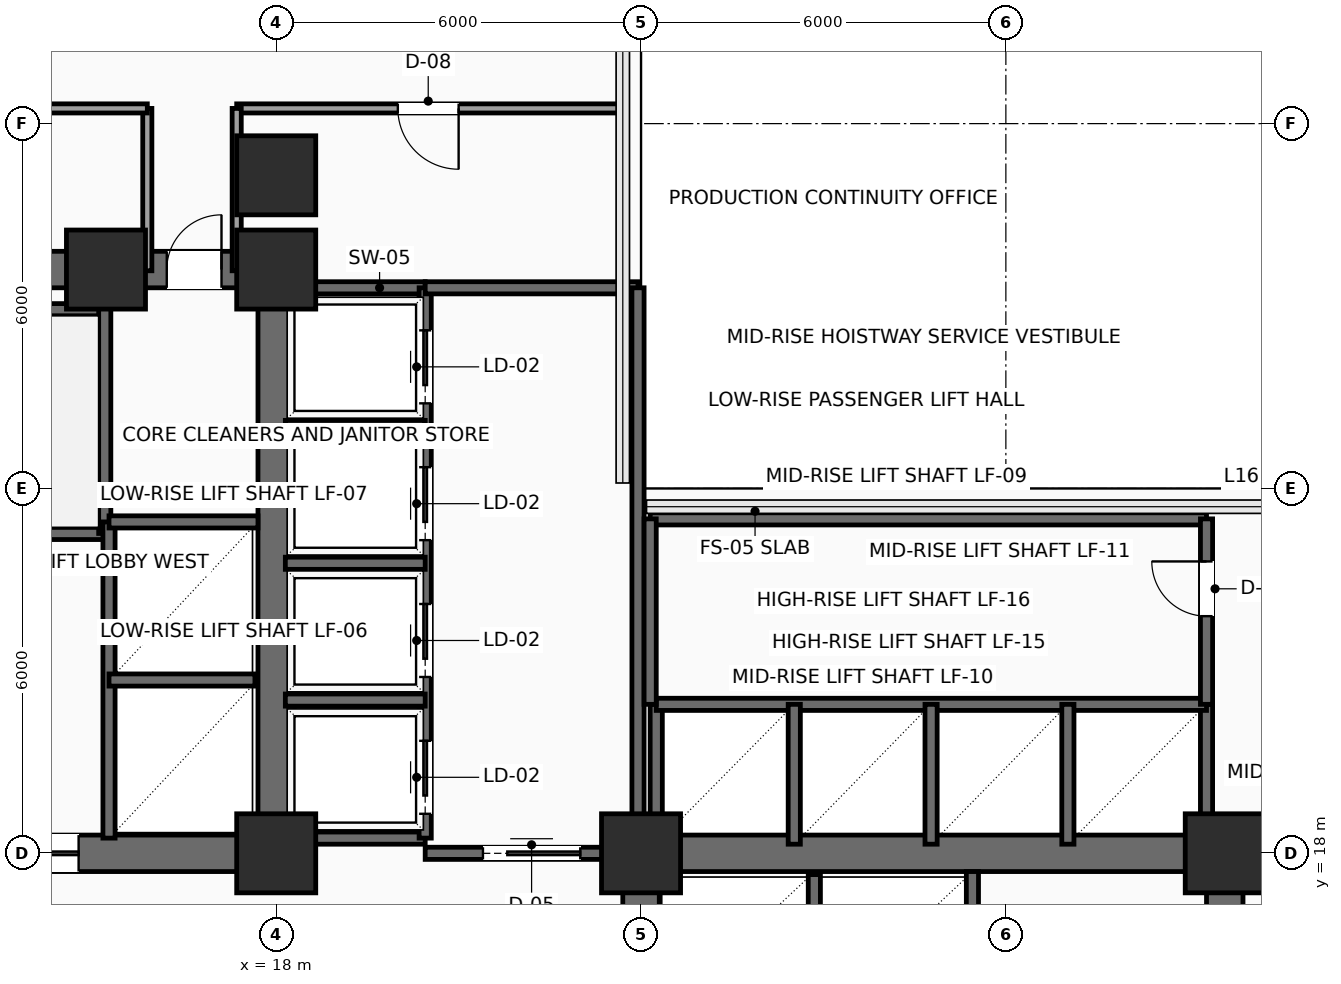
"""IFC4 building model, lengths in metres.
Left out: names, types, materials, properties, quantities, classifications, styles, units other than length and angle.
Written with IfcOpenShell. Run it as: python <this file> out.ifc"""

import sys

from ifc_helpers import new_model, si_unit, direction, frame, frame_2d, origin, origin_2d, place, context, subcontext, project, spatial, rectangle, extrude, element, fill, save


model = new_model("IFC4")
c1 = context("Model", 3, precision=1e-05, world=origin(), true_north=direction((0.0, 1.0)))
c2 = subcontext(c1, "Body", "Model", "MODEL_VIEW")
j1 = project(units=[si_unit("LENGTHUNIT", "METRE"), si_unit("PLANEANGLEUNIT", "RADIAN")], contexts=[c1])
p1 = place(None, origin())
s1 = spatial("IfcSite", under=j1, at=p1, CompositionType="ELEMENT")
p2 = place(p1, origin())
s2 = spatial("IfcBuilding", under=s1, at=p2, CompositionType="ELEMENT")
p3 = place(p2, frame((0.0, 0.0, 71.4)))
s3 = spatial("IfcBuildingStorey", under=s2, at=p3, CompositionType="ELEMENT", Elevation=71.4)
for number, where, z_axis, x_axis in (
    (1, (18.0, 18.0, 0.0), (0.0, 0.0, 1.0), (1.0, 0.0, 0.0)),
    (2, (15.2, 27.6, 0.0), (0.0, 0.0, 1.0), (1.0, 0.0, 0.0)),
    (3, (18.0, 27.6, 0.0), (0.0, 0.0, 1.0), (1.0, 0.0, 0.0)),
    (4, (24.0, 18.0, 0.0), (0.0, 0.0, 1.0), (1.0, 0.0, 0.0)),
    (5, (33.6, 18.0, 0.0), (0.0, 0.0, 1.0), (1.0, 0.0, 0.0)),
    (6, (18.0, 29.15, 0.0), (0.0, 0.0, 1.0), (1.0, 0.0, 0.0)),
):
    element("IfcColumn", number, at=place(p3, frame(where, z_axis=z_axis, x_axis=x_axis)), inside=s3, PredefinedType="COLUMN", context=c2, shape_type="SweptSolid", body=[
        extrude(rectangle(XDim=1.3, YDim=1.3, at=origin_2d()), origin(), (0.0, 0.0, 1.0), 3.9),
    ])
p4 = place(p3, frame((6.0, 18.0, 0.0), z_axis=(0.0, 0.0, 1.0), x_axis=(1.0, 0.0, 0.0)))
e7 = element("IfcWall", 7, at=p4, inside=s3, PredefinedType="SHEAR", context=c2, shape_type="SweptSolid", body=[
    extrude(rectangle(XDim=12.0, YDim=0.6, at=frame_2d((6.0, 0.0))), origin(), (0.0, 0.0, 1.0), 3.65),
])
p5 = place(p4, frame((7.15, 0.0, 0.0)))
e8 = element("IfcOpeningElement", 8, at=p5, cuts=e7, PredefinedType="OPENING", context=c2, shape_type="SweptSolid", body=[
    extrude(rectangle(XDim=1.6, YDim=2.3, at=frame_2d((0.8, 1.15))), frame((0.0, 0.31, 0.0), z_axis=(0.0, -1.0, 0.0), x_axis=(1.0, 0.0, 0.0)), (0.0, 0.0, 1.0), 0.62),
])
p6 = place(p3, frame((6.0, 27.6, 0.0), z_axis=(0.0, 0.0, 1.0), x_axis=(1.0, 0.0, 0.0)))
e9 = element("IfcWall", 9, at=p6, inside=s3, PredefinedType="SHEAR", context=c2, shape_type="SweptSolid", body=[
    extrude(rectangle(XDim=12.0, YDim=0.6, at=frame_2d((6.0, 0.0))), origin(), (0.0, 0.0, 1.0), 3.65),
])
p7 = place(p6, frame((10.2, 0.0, 0.0)))
e10 = element("IfcOpeningElement", 10, at=p7, cuts=e9, PredefinedType="OPENING", context=c2, shape_type="SweptSolid", body=[
    extrude(rectangle(XDim=0.9, YDim=2.15, at=frame_2d((0.45, 1.075))), frame((0.0, 0.31, 0.0), z_axis=(0.0, -1.0, 0.0), x_axis=(1.0, 0.0, 0.0)), (0.0, 0.0, 1.0), 0.62),
])
for number, where, z_axis, x_axis in (
    (11, (18.0, 18.0, 0.0), (0.0, 0.0, 1.0), (0.0, 1.0, 0.0)),
    (12, (24.0, 18.0, 0.0), (0.0, 0.0, 1.0), (1.0, 0.0, 0.0)),
):
    element("IfcWall", number, at=place(p3, frame(where, z_axis=z_axis, x_axis=x_axis)), inside=s3, PredefinedType="SHEAR", context=c2, shape_type="SweptSolid", body=[
        extrude(rectangle(XDim=9.6, YDim=0.6, at=frame_2d((4.8, 0.0))), origin(), (0.0, 0.0, 1.0), 3.65),
    ])
p8 = place(p3, frame((24.0, 6.0, 0.0), z_axis=(0.0, 0.0, 1.0), x_axis=(0.0, 1.0, 0.0)))
e13 = element("IfcWall", 13, at=p8, inside=s3, PredefinedType="SHEAR", context=c2, shape_type="SweptSolid", body=[
    extrude(rectangle(XDim=12.0, YDim=0.6, at=frame_2d((6.0, 0.0))), origin(), (0.0, 0.0, 1.0), 3.65),
])
p9 = place(p8, frame((7.15, 0.0, 0.0)))
e14 = element("IfcOpeningElement", 14, at=p9, cuts=e13, PredefinedType="OPENING", context=c2, shape_type="SweptSolid", body=[
    extrude(rectangle(XDim=1.6, YDim=2.3, at=frame_2d((0.8, 1.15))), frame((0.0, 0.31, 0.0), z_axis=(0.0, -1.0, 0.0), x_axis=(1.0, 0.0, 0.0)), (0.0, 0.0, 1.0), 0.62),
])
p10 = place(p3, frame((33.6, 6.0, 0.0), z_axis=(0.0, 0.0, 1.0), x_axis=(0.0, 1.0, 0.0)))
e15 = element("IfcWall", 15, at=p10, inside=s3, PredefinedType="SHEAR", context=c2, shape_type="SweptSolid", body=[
    extrude(rectangle(XDim=12.0, YDim=0.6, at=frame_2d((6.0, 0.0))), origin(), (0.0, 0.0, 1.0), 3.65),
])
p11 = place(p10, frame((10.2, 0.0, 0.0)))
e16 = element("IfcOpeningElement", 16, at=p11, cuts=e15, PredefinedType="OPENING", context=c2, shape_type="SweptSolid", body=[
    extrude(rectangle(XDim=0.9, YDim=2.15, at=frame_2d((0.45, 1.075))), frame((0.0, 0.31, 0.0), z_axis=(0.0, -1.0, 0.0), x_axis=(1.0, 0.0, 0.0)), (0.0, 0.0, 1.0), 0.62),
])
p12 = place(p3, frame((6.3, 23.26, 0.0), z_axis=(0.0, 0.0, 1.0), x_axis=(1.0, 0.0, 0.0)))
e17 = element("IfcWall", 17, at=p12, inside=s3, PredefinedType="SHEAR", context=c2, shape_type="SweptSolid", body=[
    extrude(rectangle(XDim=8.88, YDim=0.2, at=frame_2d((4.44, 0.0))), origin(), (0.0, 0.0, 1.0), 3.65),
])
p13 = place(p12, frame((0.35, 0.0, 0.0)))
e18 = element("IfcOpeningElement", 18, at=p13, cuts=e17, PredefinedType="OPENING", context=c2, shape_type="SweptSolid", body=[
    extrude(rectangle(XDim=1.1, YDim=2.2, at=frame_2d((0.55, 1.1))), frame((0.0, 0.11, 0.0), z_axis=(0.0, -1.0, 0.0), x_axis=(1.0, 0.0, 0.0)), (0.0, 0.0, 1.0), 0.22),
])
p14 = place(p3, frame((6.3, 26.94, 0.0), z_axis=(0.0, 0.0, 1.0), x_axis=(1.0, 0.0, 0.0)))
e19 = element("IfcWall", 19, at=p14, inside=s3, PredefinedType="SHEAR", context=c2, shape_type="SweptSolid", body=[
    extrude(rectangle(XDim=8.88, YDim=0.2, at=frame_2d((4.44, 0.0))), origin(), (0.0, 0.0, 1.0), 3.65),
])
p15 = place(p3, frame((15.18, 23.26, 0.0), z_axis=(0.0, 0.0, 1.0), x_axis=(0.0, 1.0, 0.0)))
e20 = element("IfcWall", 20, at=p15, inside=s3, PredefinedType="SHEAR", context=c2, shape_type="SweptSolid", body=[
    extrude(rectangle(XDim=4.04, YDim=0.2, at=frame_2d((2.02, 0.0))), origin(), (0.0, 0.0, 1.0), 3.65),
])
p16 = place(p3, frame((15.25, 18.25, 0.0), z_axis=(0.0, 0.0, 1.0), x_axis=(0.0, 1.0, 0.0)))
e21 = element("IfcWall", 21, at=p16, inside=s3, PredefinedType="SHEAR", context=c2, shape_type="SweptSolid", body=[
    extrude(rectangle(XDim=5.2, YDim=0.2, at=frame_2d((2.6, 0.0))), origin(), (0.0, 0.0, 1.0), 3.65),
])
p17 = place(p3, frame((15.25, 20.85, 0.0), z_axis=(0.0, 0.0, 1.0), x_axis=(1.0, 0.0, 0.0)))
e22 = element("IfcWall", 22, at=p17, inside=s3, PredefinedType="SHEAR", context=c2, shape_type="SweptSolid", body=[
    extrude(rectangle(XDim=2.4, YDim=0.2, at=frame_2d((1.2, 0.0))), origin(), (0.0, 0.0, 1.0), 3.65),
])
p18 = place(p3, frame((15.25, 23.45, 0.0), z_axis=(0.0, 0.0, 1.0), x_axis=(1.0, 0.0, 0.0)))
e23 = element("IfcWall", 23, at=p18, inside=s3, PredefinedType="SHEAR", context=c2, shape_type="SweptSolid", body=[
    extrude(rectangle(XDim=2.45, YDim=0.2, at=frame_2d((1.225, 0.0))), origin(), (0.0, 0.0, 1.0), 3.65),
])
p19 = place(p3, frame((26.85, 15.25, 0.0), z_axis=(0.0, 0.0, 1.0), x_axis=(0.0, 1.0, 0.0)))
e24 = element("IfcWall", 24, at=p19, inside=s3, PredefinedType="SHEAR", context=c2, shape_type="SweptSolid", body=[
    extrude(rectangle(XDim=2.4, YDim=0.2, at=frame_2d((1.2, 0.0))), origin(), (0.0, 0.0, 1.0), 3.65),
])
p20 = place(p3, frame((29.45, 15.25, 0.0), z_axis=(0.0, 0.0, 1.0), x_axis=(0.0, 1.0, 0.0)))
e25 = element("IfcWall", 25, at=p20, inside=s3, PredefinedType="SHEAR", context=c2, shape_type="SweptSolid", body=[
    extrude(rectangle(XDim=2.45, YDim=0.2, at=frame_2d((1.225, 0.0))), origin(), (0.0, 0.0, 1.0), 3.65),
])
for number, where, z_axis, x_axis in (
    (26, (18.1, 27.3, 0.0), (0.0, 0.0, 1.0), (1.0, 0.0, 0.0)),
    (27, (18.1, 18.25, 0.0), (0.0, 0.0, 1.0), (1.0, 0.0, 0.0)),
):
    element("IfcWall", number, at=place(p3, frame(where, z_axis=z_axis, x_axis=x_axis)), inside=s3, PredefinedType="SHEAR", context=c2, shape_type="SweptSolid", body=[
        extrude(rectangle(XDim=2.35, YDim=0.2, at=frame_2d((1.175, 0.0))), origin(), (0.0, 0.0, 1.0), 3.65),
    ])
p21 = place(p3, frame((20.45, 18.25, 0.0), z_axis=(0.0, 0.0, 1.0), x_axis=(0.0, 1.0, 0.0)))
e28 = element("IfcWall", 28, at=p21, inside=s3, PredefinedType="SHEAR", context=c2, shape_type="SweptSolid", body=[
    extrude(rectangle(XDim=9.05, YDim=0.2, at=frame_2d((4.525, 0.0))), origin(), (0.0, 0.0, 1.0), 3.65),
])
p22 = place(p21, frame((0.4, 0.0, 0.0)))
e29 = element("IfcOpeningElement", 29, at=p22, cuts=e28, PredefinedType="OPENING", context=c2, shape_type="SweptSolid", body=[
    extrude(rectangle(XDim=1.2, YDim=2.2, at=frame_2d((0.6, 1.1))), frame((0.0, 0.11, 0.0), z_axis=(0.0, -1.0, 0.0), x_axis=(1.0, 0.0, 0.0)), (0.0, 0.0, 1.0), 0.22),
])
p23 = place(p21, frame((2.65, 0.0, 0.0)))
e30 = element("IfcOpeningElement", 30, at=p23, cuts=e28, PredefinedType="OPENING", context=c2, shape_type="SweptSolid", body=[
    extrude(rectangle(XDim=1.2, YDim=2.2, at=frame_2d((0.6, 1.1))), frame((0.0, 0.11, 0.0), z_axis=(0.0, -1.0, 0.0), x_axis=(1.0, 0.0, 0.0)), (0.0, 0.0, 1.0), 0.22),
])
p24 = place(p21, frame((4.9, 0.0, 0.0)))
e31 = element("IfcOpeningElement", 31, at=p24, cuts=e28, PredefinedType="OPENING", context=c2, shape_type="SweptSolid", body=[
    extrude(rectangle(XDim=1.2, YDim=2.2, at=frame_2d((0.6, 1.1))), frame((0.0, 0.11, 0.0), z_axis=(0.0, -1.0, 0.0), x_axis=(1.0, 0.0, 0.0)), (0.0, 0.0, 1.0), 0.22),
])
p25 = place(p21, frame((7.15, 0.0, 0.0)))
e32 = element("IfcOpeningElement", 32, at=p25, cuts=e28, PredefinedType="OPENING", context=c2, shape_type="SweptSolid", body=[
    extrude(rectangle(XDim=1.2, YDim=2.2, at=frame_2d((0.6, 1.1))), frame((0.0, 0.11, 0.0), z_axis=(0.0, -1.0, 0.0), x_axis=(1.0, 0.0, 0.0)), (0.0, 0.0, 1.0), 0.22),
])
for number, where, z_axis, x_axis in (
    (33, (18.15, 20.52, 0.0), (0.0, 0.0, 1.0), (1.0, 0.0, 0.0)),
    (34, (18.15, 22.77, 0.0), (0.0, 0.0, 1.0), (1.0, 0.0, 0.0)),
    (35, (18.15, 25.02, 0.0), (0.0, 0.0, 1.0), (1.0, 0.0, 0.0)),
):
    element("IfcWall", number, at=place(p3, frame(where, z_axis=z_axis, x_axis=x_axis)), inside=s3, PredefinedType="SHEAR", context=c2, shape_type="SweptSolid", body=[
        extrude(rectangle(XDim=2.3, YDim=0.2, at=frame_2d((1.15, 0.0))), origin(), (0.0, 0.0, 1.0), 3.65),
    ])
p26 = place(p3, frame((20.45, 18.0, 0.0), z_axis=(0.0, 0.0, 1.0), x_axis=(1.0, 0.0, 0.0)))
e36 = element("IfcWall", 36, at=p26, inside=s3, PredefinedType="SHEAR", context=c2, shape_type="SweptSolid", body=[
    extrude(rectangle(XDim=3.5, YDim=0.2, at=frame_2d((1.75, 0.0))), origin(), (0.0, 0.0, 1.0), 3.65),
])
p27 = place(p26, frame((0.95, 0.0, 0.0)))
e37 = element("IfcOpeningElement", 37, at=p27, cuts=e36, PredefinedType="OPENING", context=c2, shape_type="SweptSolid", body=[
    extrude(rectangle(XDim=1.6, YDim=2.3, at=frame_2d((0.8, 1.15))), frame((0.0, 0.11, 0.0), z_axis=(0.0, -1.0, 0.0), x_axis=(1.0, 0.0, 0.0)), (0.0, 0.0, 1.0), 0.22),
])
p28 = place(p3, frame((20.45, 27.3, 0.0), z_axis=(0.0, 0.0, 1.0), x_axis=(1.0, 0.0, 0.0)))
e38 = element("IfcWall", 38, at=p28, inside=s3, PredefinedType="SHEAR", context=c2, shape_type="SweptSolid", body=[
    extrude(rectangle(XDim=3.5, YDim=0.2, at=frame_2d((1.75, 0.0))), origin(), (0.0, 0.0, 1.0), 3.65),
])
p29 = place(p3, frame((23.95, 18.0, 0.0), z_axis=(0.0, 0.0, 1.0), x_axis=(0.0, 1.0, 0.0)))
e39 = element("IfcWall", 39, at=p29, inside=s3, PredefinedType="SHEAR", context=c2, shape_type="SweptSolid", body=[
    extrude(rectangle(XDim=9.3, YDim=0.2, at=frame_2d((4.65, 0.0))), origin(), (0.0, 0.0, 1.0), 3.65),
])
for number, where, z_axis, x_axis in (
    (40, (33.3, 18.1, 0.0), (0.0, 0.0, 1.0), (0.0, 1.0, 0.0)),
    (41, (24.25, 18.1, 0.0), (0.0, 0.0, 1.0), (0.0, 1.0, 0.0)),
):
    element("IfcWall", number, at=place(p3, frame(where, z_axis=z_axis, x_axis=x_axis)), inside=s3, PredefinedType="SHEAR", context=c2, shape_type="SweptSolid", body=[
        extrude(rectangle(XDim=2.35, YDim=0.2, at=frame_2d((1.175, 0.0))), origin(), (0.0, 0.0, 1.0), 3.65),
    ])
p30 = place(p3, frame((24.25, 20.45, 0.0), z_axis=(0.0, 0.0, 1.0), x_axis=(1.0, 0.0, 0.0)))
e42 = element("IfcWall", 42, at=p30, inside=s3, PredefinedType="SHEAR", context=c2, shape_type="SweptSolid", body=[
    extrude(rectangle(XDim=9.05, YDim=0.2, at=frame_2d((4.525, 0.0))), origin(), (0.0, 0.0, 1.0), 3.65),
])
for number, where, z_axis, x_axis in (
    (43, (26.52, 18.15, 0.0), (0.0, 0.0, 1.0), (0.0, 1.0, 0.0)),
    (44, (28.77, 18.15, 0.0), (0.0, 0.0, 1.0), (0.0, 1.0, 0.0)),
    (45, (31.02, 18.15, 0.0), (0.0, 0.0, 1.0), (0.0, 1.0, 0.0)),
):
    element("IfcWall", number, at=place(p3, frame(where, z_axis=z_axis, x_axis=x_axis)), inside=s3, PredefinedType="SHEAR", context=c2, shape_type="SweptSolid", body=[
        extrude(rectangle(XDim=2.3, YDim=0.2, at=frame_2d((1.15, 0.0))), origin(), (0.0, 0.0, 1.0), 3.65),
    ])
p31 = place(p3, frame((24.15, 23.5, 0.0), z_axis=(0.0, 0.0, 1.0), x_axis=(1.0, 0.0, 0.0)))
e46 = element("IfcWall", 46, at=p31, inside=s3, PredefinedType="SHEAR", context=c2, shape_type="SweptSolid", body=[
    extrude(rectangle(XDim=9.15, YDim=0.2, at=frame_2d((4.575, 0.0))), origin(), (0.0, 0.0, 1.0), 3.65),
])
p32 = place(p3, frame((33.3, 20.45, 0.0), z_axis=(0.0, 0.0, 1.0), x_axis=(0.0, 1.0, 0.0)))
e47 = element("IfcWall", 47, at=p32, inside=s3, PredefinedType="SHEAR", context=c2, shape_type="SweptSolid", body=[
    extrude(rectangle(XDim=3.05, YDim=0.2, at=frame_2d((1.525, 0.0))), origin(), (0.0, 0.0, 1.0), 3.65),
])
p33 = place(p32, frame((1.45, 0.0, 0.0)))
e48 = element("IfcOpeningElement", 48, at=p33, cuts=e47, PredefinedType="OPENING", context=c2, shape_type="SweptSolid", body=[
    extrude(rectangle(XDim=0.9, YDim=2.15, at=frame_2d((0.45, 1.075))), frame((0.0, 0.11, 0.0), z_axis=(0.0, -1.0, 0.0), x_axis=(1.0, 0.0, 0.0)), (0.0, 0.0, 1.0), 0.22),
])
p34 = place(p3, frame((24.15, 20.45, 0.0), z_axis=(0.0, 0.0, 1.0), x_axis=(0.0, 1.0, 0.0)))
e49 = element("IfcWall", 49, at=p34, inside=s3, PredefinedType="SHEAR", context=c2, shape_type="SweptSolid", body=[
    extrude(rectangle(XDim=3.05, YDim=0.2, at=frame_2d((1.525, 0.0))), origin(), (0.0, 0.0, 1.0), 3.65),
])
p35 = place(p3, frame((23.7, 30.25, 0.0), z_axis=(0.0, 0.0, 1.0), x_axis=(-1.0, 0.0, 0.0)))
e50 = element("IfcWall", 50, at=p35, inside=s3, PredefinedType="PARTITIONING", context=c2, shape_type="SweptSolid", body=[
    extrude(rectangle(XDim=6.35, YDim=0.15, at=frame_2d((3.175, 0.0))), origin(), (0.0, 0.0, 1.0), 3.65),
])
p36 = place(p35, frame((2.7, 0.0, 0.0)))
e51 = element("IfcOpeningElement", 51, at=p36, cuts=e50, PredefinedType="OPENING", context=c2, shape_type="SweptSolid", body=[
    extrude(rectangle(XDim=1.0, YDim=2.2, at=frame_2d((0.5, 1.1))), frame((0.0, 0.085, 0.0), z_axis=(0.0, -1.0, 0.0), x_axis=(1.0, 0.0, 0.0)), (0.0, 0.0, 1.0), 0.17),
])
for number, where, z_axis, x_axis in (
    (52, (17.35, 30.25, 0.0), (0.0, 0.0, 1.0), (0.0, -1.0, 0.0)),
    (53, (15.88, 27.58, 0.0), (0.0, 0.0, 1.0), (0.0, 1.0, 0.0)),
):
    element("IfcWall", number, at=place(p3, frame(where, z_axis=z_axis, x_axis=x_axis)), inside=s3, PredefinedType="PARTITIONING", context=c2, shape_type="SweptSolid", body=[
        extrude(rectangle(XDim=2.67, YDim=0.15, at=frame_2d((1.335, 0.0))), origin(), (0.0, 0.0, 1.0), 3.65),
    ])
p37 = place(p3, frame((15.88, 30.25, 0.0), z_axis=(0.0, 0.0, 1.0), x_axis=(-1.0, 0.0, 0.0)))
e54 = element("IfcWall", 54, at=p37, inside=s3, PredefinedType="PARTITIONING", context=c2, shape_type="SweptSolid", body=[
    extrude(rectangle(XDim=10.63, YDim=0.15, at=frame_2d((5.315, 0.0))), origin(), (0.0, 0.0, 1.0), 3.65),
])
p38 = place(p37, frame((6.13, 0.0, 0.0)))
e55 = element("IfcOpeningElement", 55, at=p38, cuts=e54, PredefinedType="OPENING", context=c2, shape_type="SweptSolid", body=[
    extrude(rectangle(XDim=0.9, YDim=2.1, at=frame_2d((0.45, 1.05))), frame((0.0, 0.085, 0.0), z_axis=(0.0, -1.0, 0.0), x_axis=(1.0, 0.0, 0.0)), (0.0, 0.0, 1.0), 0.17),
])
p39 = place(p5, origin())
e56 = element("IfcDoor", 56, at=p39, inside=s3, OperationType="DOUBLE_DOOR_SLIDING", PredefinedType="DOOR", context=c2, shape_type="SweptSolid", body=[
    extrude(rectangle(XDim=1.6, YDim=2.3, at=frame_2d((0.8, 1.15))), frame((0.0, 0.025, 0.0), z_axis=(0.0, -1.0, 0.0), x_axis=(1.0, 0.0, 0.0)), (0.0, 0.0, 1.0), 0.05),
])
fill(e8, e56)
p40 = place(p7, origin())
e57 = element("IfcDoor", 57, at=p40, inside=s3, OperationType="SINGLE_SWING_RIGHT", PredefinedType="DOOR", context=c2, shape_type="SweptSolid", body=[
    extrude(rectangle(XDim=0.9, YDim=2.15, at=frame_2d((0.45, 1.075))), frame((0.0, 0.025, 0.0), z_axis=(0.0, -1.0, 0.0), x_axis=(1.0, 0.0, 0.0)), (0.0, 0.0, 1.0), 0.05),
])
fill(e10, e57)
p41 = place(p22, origin())
e58 = element("IfcDoor", 58, at=p41, inside=s3, OperationType="SLIDING_TO_RIGHT", PredefinedType="DOOR", context=c2, shape_type="SweptSolid", body=[
    extrude(rectangle(XDim=1.2, YDim=2.2, at=frame_2d((0.6, 1.1))), frame((0.0, 0.025, 0.0), z_axis=(0.0, -1.0, 0.0), x_axis=(1.0, 0.0, 0.0)), (0.0, 0.0, 1.0), 0.05),
])
fill(e29, e58)
p42 = place(p23, origin())
e59 = element("IfcDoor", 59, at=p42, inside=s3, OperationType="SLIDING_TO_RIGHT", PredefinedType="DOOR", context=c2, shape_type="SweptSolid", body=[
    extrude(rectangle(XDim=1.2, YDim=2.2, at=frame_2d((0.6, 1.1))), frame((0.0, 0.025, 0.0), z_axis=(0.0, -1.0, 0.0), x_axis=(1.0, 0.0, 0.0)), (0.0, 0.0, 1.0), 0.05),
])
fill(e30, e59)
p43 = place(p24, origin())
e60 = element("IfcDoor", 60, at=p43, inside=s3, OperationType="SLIDING_TO_RIGHT", PredefinedType="DOOR", context=c2, shape_type="SweptSolid", body=[
    extrude(rectangle(XDim=1.2, YDim=2.2, at=frame_2d((0.6, 1.1))), frame((0.0, 0.025, 0.0), z_axis=(0.0, -1.0, 0.0), x_axis=(1.0, 0.0, 0.0)), (0.0, 0.0, 1.0), 0.05),
])
fill(e31, e60)
p44 = place(p25, origin())
e61 = element("IfcDoor", 61, at=p44, inside=s3, OperationType="SLIDING_TO_RIGHT", PredefinedType="DOOR", context=c2, shape_type="SweptSolid", body=[
    extrude(rectangle(XDim=1.2, YDim=2.2, at=frame_2d((0.6, 1.1))), frame((0.0, 0.025, 0.0), z_axis=(0.0, -1.0, 0.0), x_axis=(1.0, 0.0, 0.0)), (0.0, 0.0, 1.0), 0.05),
])
fill(e32, e61)
p45 = place(p27, origin())
e62 = element("IfcDoor", 62, at=p45, inside=s3, OperationType="DOUBLE_DOOR_SLIDING", PredefinedType="DOOR", context=c2, shape_type="SweptSolid", body=[
    extrude(rectangle(XDim=1.6, YDim=2.3, at=frame_2d((0.8, 1.15))), frame((0.0, 0.025, 0.0), z_axis=(0.0, -1.0, 0.0), x_axis=(1.0, 0.0, 0.0)), (0.0, 0.0, 1.0), 0.05),
])
fill(e37, e62)
p46 = place(p33, origin())
e63 = element("IfcDoor", 63, at=p46, inside=s3, OperationType="SINGLE_SWING_RIGHT", PredefinedType="DOOR", context=c2, shape_type="SweptSolid", body=[
    extrude(rectangle(XDim=0.9, YDim=2.15, at=frame_2d((0.45, 1.075))), frame((0.0, 0.025, 0.0), z_axis=(0.0, -1.0, 0.0), x_axis=(1.0, 0.0, 0.0)), (0.0, 0.0, 1.0), 0.05),
])
fill(e48, e63)
p47 = place(p36, origin())
e64 = element("IfcDoor", 64, at=p47, inside=s3, OperationType="SINGLE_SWING_LEFT", PredefinedType="DOOR", context=c2, shape_type="SweptSolid", body=[
    extrude(rectangle(XDim=1.0, YDim=2.2, at=frame_2d((0.5, 1.1))), frame((0.0, 0.025, 0.0), z_axis=(0.0, -1.0, 0.0), x_axis=(1.0, 0.0, 0.0)), (0.0, 0.0, 1.0), 0.05),
])
fill(e51, e64)
save(model, sys.argv[1])
